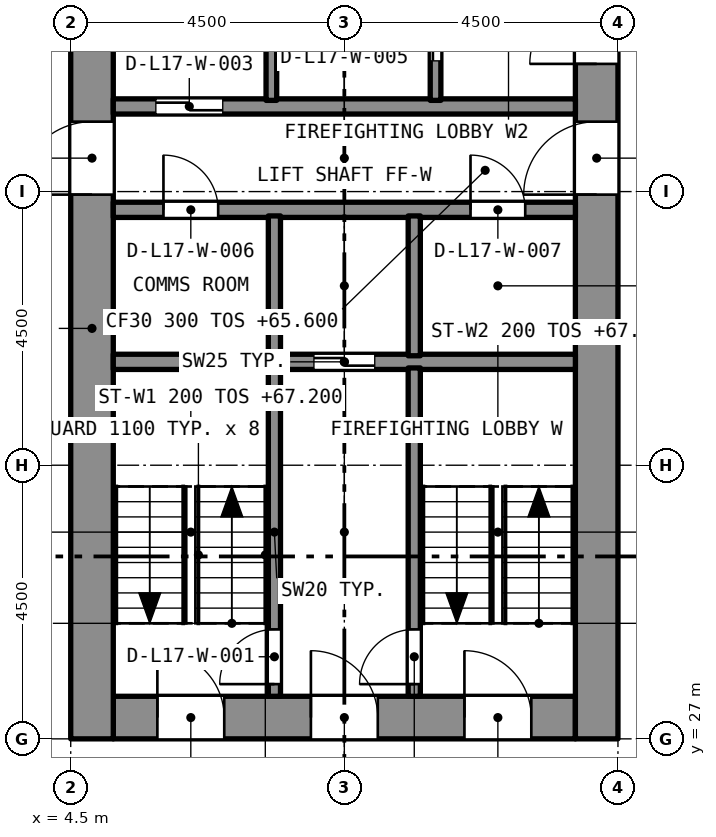
"""IFC4 building model, lengths in metres.
Left out: names, types, materials, properties, quantities, classifications, styles, units other than length and angle.
Written with IfcOpenShell. Run it as: python <this file> out.ifc"""

import sys

from ifc_helpers import new_model, si_unit, direction, frame, frame_2d, origin, place, context, subcontext, project, spatial, rectangle, extrude, element, fill, save


model = new_model("IFC4")
c1 = context("Model", 3, precision=1e-05, world=origin(), true_north=direction((0.0, 1.0)))
c2 = subcontext(c1, "Body", "Model", "MODEL_VIEW")
j1 = project(units=[si_unit("LENGTHUNIT", "METRE"), si_unit("PLANEANGLEUNIT", "RADIAN")], contexts=[c1])
p1 = place(None, origin())
s1 = spatial("IfcSite", under=j1, at=p1, CompositionType="ELEMENT")
p2 = place(p1, origin())
s2 = spatial("IfcBuilding", under=s1, at=p2, CompositionType="ELEMENT")
p3 = place(p2, frame((0.0, 0.0, 65.6)))
s3 = spatial("IfcBuildingStorey", under=s2, at=p3, CompositionType="ELEMENT", Elevation=65.6)
p4 = place(p3, frame((5.2, 27.35, 0.0), z_axis=(0.0, 0.0, 1.0), x_axis=(1.0, 0.0, 0.0)))
e1 = element("IfcWall", 1, at=p4, inside=s3, PredefinedType="SOLIDWALL", context=c2, shape_type="SweptSolid", body=[
    extrude(rectangle(XDim=7.6, YDim=0.7, at=frame_2d((3.8, 0.0))), origin(), (0.0, 0.0, 1.0), 3.2),
])
p5 = place(p4, frame((0.725, 0.0, 0.0)))
e2 = element("IfcOpeningElement", 2, at=p5, cuts=e1, PredefinedType="OPENING", context=c2, shape_type="SweptSolid", body=[
    extrude(rectangle(XDim=1.1, YDim=2.1, at=frame_2d((0.55, 1.05))), frame((0.0, 0.36, 0.0), z_axis=(0.0, -1.0, 0.0), x_axis=(1.0, 0.0, 0.0)), (0.0, 0.0, 1.0), 0.72),
])
p6 = place(p4, frame((3.25, 0.0, 0.0)))
e3 = element("IfcOpeningElement", 3, at=p6, cuts=e1, PredefinedType="OPENING", context=c2, shape_type="SweptSolid", body=[
    extrude(rectangle(XDim=1.1, YDim=2.1, at=frame_2d((0.55, 1.05))), frame((0.0, 0.36, 0.0), z_axis=(0.0, -1.0, 0.0), x_axis=(1.0, 0.0, 0.0)), (0.0, 0.0, 1.0), 0.72),
])
p7 = place(p4, frame((5.775, 0.0, 0.0)))
e4 = element("IfcOpeningElement", 4, at=p7, cuts=e1, PredefinedType="OPENING", context=c2, shape_type="SweptSolid", body=[
    extrude(rectangle(XDim=1.1, YDim=2.1, at=frame_2d((0.55, 1.05))), frame((0.0, 0.36, 0.0), z_axis=(0.0, -1.0, 0.0), x_axis=(1.0, 0.0, 0.0)), (0.0, 0.0, 1.0), 0.72),
])
p8 = place(p3, frame((4.85, 27.0, 0.0), z_axis=(0.0, 0.0, 1.0), x_axis=(0.0, 1.0, 0.0)))
e5 = element("IfcWall", 5, at=p8, inside=s3, PredefinedType="SOLIDWALL", context=c2, shape_type="SweptSolid", body=[
    extrude(rectangle(XDim=13.5, YDim=0.7, at=frame_2d((6.75, 0.0))), origin(), (0.0, 0.0, 1.0), 3.2),
])
p9 = place(p8, frame((8.95, 0.0, 0.0)))
e6 = element("IfcOpeningElement", 6, at=p9, cuts=e5, PredefinedType="OPENING", context=c2, shape_type="SweptSolid", body=[
    extrude(rectangle(XDim=1.2, YDim=2.1, at=frame_2d((0.6, 1.05))), frame((0.0, 0.36, 0.0), z_axis=(0.0, -1.0, 0.0), x_axis=(1.0, 0.0, 0.0)), (0.0, 0.0, 1.0), 0.72),
])
p10 = place(p3, frame((13.15, 27.0, 0.0), z_axis=(0.0, 0.0, 1.0), x_axis=(0.0, 1.0, 0.0)))
e7 = element("IfcWall", 7, at=p10, inside=s3, PredefinedType="SOLIDWALL", context=c2, shape_type="SweptSolid", body=[
    extrude(rectangle(XDim=13.5, YDim=0.7, at=frame_2d((6.75, 0.0))), origin(), (0.0, 0.0, 1.0), 3.2),
])
p11 = place(p10, frame((11.1, 0.0, 0.0)))
e8 = element("IfcOpeningElement", 8, at=p11, cuts=e7, PredefinedType="OPENING", context=c2, shape_type="SweptSolid", body=[
    extrude(rectangle(XDim=1.1, YDim=2.1, at=frame_2d((0.55, 1.05))), frame((0.0, 0.36, 0.0), z_axis=(0.0, -1.0, 0.0), x_axis=(1.0, 0.0, 0.0)), (0.0, 0.0, 1.0), 0.72),
])
p12 = place(p10, frame((8.95, 0.0, 0.0)))
e9 = element("IfcOpeningElement", 9, at=p12, cuts=e7, PredefinedType="OPENING", context=c2, shape_type="SweptSolid", body=[
    extrude(rectangle(XDim=1.2, YDim=2.1, at=frame_2d((0.6, 1.05))), frame((0.0, 0.36, 0.0), z_axis=(0.0, -1.0, 0.0), x_axis=(1.0, 0.0, 0.0)), (0.0, 0.0, 1.0), 0.72),
])
p13 = place(p3, frame((5.2, 33.2, 0.0), z_axis=(0.0, 0.0, 1.0), x_axis=(1.0, 0.0, 0.0)))
e10 = element("IfcWall", 10, at=p13, inside=s3, PredefinedType="SOLIDWALL", context=c2, shape_type="SweptSolid", body=[
    extrude(rectangle(XDim=7.6, YDim=0.25, at=frame_2d((3.8, 0.0))), origin(), (0.0, 0.0, 1.0), 2.9),
])
p14 = place(p13, frame((3.3, 0.0, 0.0)))
e11 = element("IfcOpeningElement", 11, at=p14, cuts=e10, PredefinedType="OPENING", context=c2, shape_type="SweptSolid", body=[
    extrude(rectangle(XDim=1.0, YDim=2.1, at=frame_2d((0.5, 1.05))), frame((0.0, 0.135, 0.0), z_axis=(0.0, -1.0, 0.0), x_axis=(1.0, 0.0, 0.0)), (0.0, 0.0, 1.0), 0.27),
])
p15 = place(p3, frame((5.2, 35.7, 0.0), z_axis=(0.0, 0.0, 1.0), x_axis=(1.0, 0.0, 0.0)))
e12 = element("IfcWall", 12, at=p15, inside=s3, PredefinedType="SOLIDWALL", context=c2, shape_type="SweptSolid", body=[
    extrude(rectangle(XDim=7.6, YDim=0.25, at=frame_2d((3.8, 0.0))), origin(), (0.0, 0.0, 1.0), 2.9),
])
p16 = place(p15, frame((0.825, 0.0, 0.0)))
e13 = element("IfcOpeningElement", 13, at=p16, cuts=e12, PredefinedType="OPENING", context=c2, shape_type="SweptSolid", body=[
    extrude(rectangle(XDim=0.9, YDim=2.1, at=frame_2d((0.45, 1.05))), frame((0.0, 0.135, 0.0), z_axis=(0.0, -1.0, 0.0), x_axis=(1.0, 0.0, 0.0)), (0.0, 0.0, 1.0), 0.27),
])
p17 = place(p15, frame((5.875, 0.0, 0.0)))
e14 = element("IfcOpeningElement", 14, at=p17, cuts=e12, PredefinedType="OPENING", context=c2, shape_type="SweptSolid", body=[
    extrude(rectangle(XDim=0.9, YDim=2.1, at=frame_2d((0.45, 1.05))), frame((0.0, 0.135, 0.0), z_axis=(0.0, -1.0, 0.0), x_axis=(1.0, 0.0, 0.0)), (0.0, 0.0, 1.0), 0.27),
])
p18 = place(p3, frame((5.2, 37.4, 0.0), z_axis=(0.0, 0.0, 1.0), x_axis=(1.0, 0.0, 0.0)))
e15 = element("IfcWall", 15, at=p18, inside=s3, PredefinedType="SOLIDWALL", context=c2, shape_type="SweptSolid", body=[
    extrude(rectangle(XDim=7.6, YDim=0.25, at=frame_2d((3.8, 0.0))), origin(), (0.0, 0.0, 1.0), 2.9),
])
p19 = place(p18, frame((0.7, 0.0, 0.0)))
e16 = element("IfcOpeningElement", 16, at=p19, cuts=e15, PredefinedType="OPENING", context=c2, shape_type="SweptSolid", body=[
    extrude(rectangle(XDim=1.1, YDim=2.4, at=frame_2d((0.55, 1.2))), frame((0.0, 0.135, 0.0), z_axis=(0.0, -1.0, 0.0), x_axis=(1.0, 0.0, 0.0)), (0.0, 0.0, 1.0), 0.27),
])
p20 = place(p3, frame((7.85, 27.7, 0.0), z_axis=(0.0, 0.0, 1.0), x_axis=(0.0, 1.0, 0.0)))
e17 = element("IfcWall", 17, at=p20, inside=s3, PredefinedType="SOLIDWALL", context=c2, shape_type="SweptSolid", body=[
    extrude(rectangle(XDim=5.4, YDim=0.2, at=frame_2d((2.7, 0.0))), origin(), (0.0, 0.0, 1.0), 2.9),
])
p21 = place(p20, frame((0.2, 0.0, 0.0)))
e18 = element("IfcOpeningElement", 18, at=p21, cuts=e17, PredefinedType="OPENING", context=c2, shape_type="SweptSolid", body=[
    extrude(rectangle(XDim=0.9, YDim=2.1, at=frame_2d((0.45, 1.05))), frame((0.0, 0.11, 0.0), z_axis=(0.0, -1.0, 0.0), x_axis=(1.0, 0.0, 0.0)), (0.0, 0.0, 1.0), 0.22),
])
p22 = place(p3, frame((10.15, 27.7, 0.0), z_axis=(0.0, 0.0, 1.0), x_axis=(0.0, 1.0, 0.0)))
e19 = element("IfcWall", 19, at=p22, inside=s3, PredefinedType="SOLIDWALL", context=c2, shape_type="SweptSolid", body=[
    extrude(rectangle(XDim=5.4, YDim=0.2, at=frame_2d((2.7, 0.0))), origin(), (0.0, 0.0, 1.0), 2.9),
])
p23 = place(p22, frame((0.2, 0.0, 0.0)))
e20 = element("IfcOpeningElement", 20, at=p23, cuts=e19, PredefinedType="OPENING", context=c2, shape_type="SweptSolid", body=[
    extrude(rectangle(XDim=0.9, YDim=2.1, at=frame_2d((0.45, 1.05))), frame((0.0, 0.11, 0.0), z_axis=(0.0, -1.0, 0.0), x_axis=(1.0, 0.0, 0.0)), (0.0, 0.0, 1.0), 0.22),
])
for number, where, z_axis, x_axis in (
    (21, (7.85, 33.3, 0.0), (0.0, 0.0, 1.0), (0.0, 1.0, 0.0)),
    (22, (10.15, 33.3, 0.0), (0.0, 0.0, 1.0), (0.0, 1.0, 0.0)),
):
    element("IfcWall", number, at=place(p3, frame(where, z_axis=z_axis, x_axis=x_axis)), inside=s3, PredefinedType="SOLIDWALL", context=c2, shape_type="SweptSolid", body=[
        extrude(rectangle(XDim=2.3, YDim=0.2, at=frame_2d((1.15, 0.0))), origin(), (0.0, 0.0, 1.0), 2.9),
    ])
p24 = place(p3, frame((7.8, 37.5, 0.0), z_axis=(0.0, 0.0, 1.0), x_axis=(0.0, 1.0, 0.0)))
e23 = element("IfcWall", 23, at=p24, inside=s3, PredefinedType="SOLIDWALL", context=c2, shape_type="SweptSolid", body=[
    extrude(rectangle(XDim=2.3, YDim=0.175, at=frame_2d((1.15, 0.0))), origin(), (0.0, 0.0, 1.0), 2.9),
])
p25 = place(p3, frame((10.5, 37.5, 0.0), z_axis=(0.0, 0.0, 1.0), x_axis=(0.0, 1.0, 0.0)))
e24 = element("IfcWall", 24, at=p25, inside=s3, PredefinedType="SOLIDWALL", context=c2, shape_type="SweptSolid", body=[
    extrude(rectangle(XDim=2.3, YDim=0.175, at=frame_2d((1.15, 0.0))), origin(), (0.0, 0.0, 1.0), 2.9),
])
p26 = place(p25, frame((0.65, 0.0, 0.0)))
e25 = element("IfcOpeningElement", 25, at=p26, cuts=e24, PredefinedType="OPENING", context=c2, shape_type="SweptSolid", body=[
    extrude(rectangle(XDim=1.0, YDim=2.1, at=frame_2d((0.5, 1.05))), frame((0.0, 0.097, 0.0), z_axis=(0.0, -1.0, 0.0), x_axis=(1.0, 0.0, 0.0)), (0.0, 0.0, 1.0), 0.195),
])
p27 = place(p21, origin())
e26 = element("IfcDoor", 26, at=p27, inside=s3, OperationType="SINGLE_SWING_LEFT", PredefinedType="DOOR", context=c2, shape_type="SweptSolid", body=[
    extrude(rectangle(XDim=0.9, YDim=2.1, at=frame_2d((0.45, 1.05))), frame((0.0, 0.025, 0.0), z_axis=(0.0, -1.0, 0.0), x_axis=(1.0, 0.0, 0.0)), (0.0, 0.0, 1.0), 0.05),
])
fill(e18, e26)
p28 = place(p23, origin())
e27 = element("IfcDoor", 27, at=p28, inside=s3, OperationType="SINGLE_SWING_LEFT", PredefinedType="DOOR", context=c2, shape_type="SweptSolid", body=[
    extrude(rectangle(XDim=0.9, YDim=2.1, at=frame_2d((0.45, 1.05))), frame((0.0, 0.025, 0.0), z_axis=(0.0, -1.0, 0.0), x_axis=(1.0, 0.0, 0.0)), (0.0, 0.0, 1.0), 0.05),
])
fill(e20, e27)
p29 = place(p19, origin())
e28 = element("IfcDoor", 28, at=p29, inside=s3, OperationType="SLIDING_TO_LEFT", PredefinedType="DOOR", context=c2, shape_type="SweptSolid", body=[
    extrude(rectangle(XDim=1.1, YDim=2.4, at=frame_2d((0.55, 1.2))), frame((0.0, 0.025, 0.0), z_axis=(0.0, -1.0, 0.0), x_axis=(1.0, 0.0, 0.0)), (0.0, 0.0, 1.0), 0.05),
])
fill(e16, e28)
p30 = place(p26, origin())
e29 = element("IfcDoor", 29, at=p30, inside=s3, OperationType="SLIDING_TO_LEFT", PredefinedType="DOOR", context=c2, shape_type="SweptSolid", body=[
    extrude(rectangle(XDim=1.0, YDim=2.1, at=frame_2d((0.5, 1.05))), frame((0.0, 0.025, 0.0), z_axis=(0.0, -1.0, 0.0), x_axis=(1.0, 0.0, 0.0)), (0.0, 0.0, 1.0), 0.05),
])
fill(e25, e29)
p31 = place(p14, origin())
e30 = element("IfcDoor", 30, at=p31, inside=s3, OperationType="SLIDING_TO_LEFT", PredefinedType="DOOR", context=c2, shape_type="SweptSolid", body=[
    extrude(rectangle(XDim=1.0, YDim=2.1, at=frame_2d((0.5, 1.05))), frame((0.0, 0.025, 0.0), z_axis=(0.0, -1.0, 0.0), x_axis=(1.0, 0.0, 0.0)), (0.0, 0.0, 1.0), 0.05),
])
fill(e11, e30)
p32 = place(p16, origin())
e31 = element("IfcDoor", 31, at=p32, inside=s3, OperationType="SINGLE_SWING_LEFT", PredefinedType="DOOR", context=c2, shape_type="SweptSolid", body=[
    extrude(rectangle(XDim=0.9, YDim=2.1, at=frame_2d((0.45, 1.05))), frame((0.0, 0.025, 0.0), z_axis=(0.0, -1.0, 0.0), x_axis=(1.0, 0.0, 0.0)), (0.0, 0.0, 1.0), 0.05),
])
fill(e13, e31)
p33 = place(p17, origin())
e32 = element("IfcDoor", 32, at=p33, inside=s3, OperationType="SINGLE_SWING_LEFT", PredefinedType="DOOR", context=c2, shape_type="SweptSolid", body=[
    extrude(rectangle(XDim=0.9, YDim=2.1, at=frame_2d((0.45, 1.05))), frame((0.0, 0.025, 0.0), z_axis=(0.0, -1.0, 0.0), x_axis=(1.0, 0.0, 0.0)), (0.0, 0.0, 1.0), 0.05),
])
fill(e14, e32)
p34 = place(p5, origin())
e33 = element("IfcDoor", 33, at=p34, inside=s3, OperationType="SINGLE_SWING_LEFT", PredefinedType="DOOR", context=c2, shape_type="SweptSolid", body=[
    extrude(rectangle(XDim=1.1, YDim=2.1, at=frame_2d((0.55, 1.05))), frame((0.0, 0.025, 0.0), z_axis=(0.0, -1.0, 0.0), x_axis=(1.0, 0.0, 0.0)), (0.0, 0.0, 1.0), 0.05),
])
fill(e2, e33)
p35 = place(p6, origin())
e34 = element("IfcDoor", 34, at=p35, inside=s3, OperationType="SINGLE_SWING_LEFT", PredefinedType="DOOR", context=c2, shape_type="SweptSolid", body=[
    extrude(rectangle(XDim=1.1, YDim=2.1, at=frame_2d((0.55, 1.05))), frame((0.0, 0.025, 0.0), z_axis=(0.0, -1.0, 0.0), x_axis=(1.0, 0.0, 0.0)), (0.0, 0.0, 1.0), 0.05),
])
fill(e3, e34)
p36 = place(p7, origin())
e35 = element("IfcDoor", 35, at=p36, inside=s3, OperationType="SINGLE_SWING_LEFT", PredefinedType="DOOR", context=c2, shape_type="SweptSolid", body=[
    extrude(rectangle(XDim=1.1, YDim=2.1, at=frame_2d((0.55, 1.05))), frame((0.0, 0.025, 0.0), z_axis=(0.0, -1.0, 0.0), x_axis=(1.0, 0.0, 0.0)), (0.0, 0.0, 1.0), 0.05),
])
fill(e4, e35)
p37 = place(p11, origin())
e36 = element("IfcDoor", 36, at=p37, inside=s3, OperationType="SINGLE_SWING_LEFT", PredefinedType="DOOR", context=c2, shape_type="SweptSolid", body=[
    extrude(rectangle(XDim=1.1, YDim=2.1, at=frame_2d((0.55, 1.05))), frame((0.0, 0.025, 0.0), z_axis=(0.0, -1.0, 0.0), x_axis=(1.0, 0.0, 0.0)), (0.0, 0.0, 1.0), 0.05),
])
fill(e8, e36)
p38 = place(p9, origin())
e37 = element("IfcDoor", 37, at=p38, inside=s3, OperationType="SINGLE_SWING_LEFT", PredefinedType="DOOR", context=c2, shape_type="SweptSolid", body=[
    extrude(rectangle(XDim=1.2, YDim=2.1, at=frame_2d((0.6, 1.05))), frame((0.0, 0.025, 0.0), z_axis=(0.0, -1.0, 0.0), x_axis=(1.0, 0.0, 0.0)), (0.0, 0.0, 1.0), 0.05),
])
fill(e6, e37)
p39 = place(p12, origin())
e38 = element("IfcDoor", 38, at=p39, inside=s3, OperationType="SINGLE_SWING_LEFT", PredefinedType="DOOR", context=c2, shape_type="SweptSolid", body=[
    extrude(rectangle(XDim=1.2, YDim=2.1, at=frame_2d((0.6, 1.05))), frame((0.0, 0.025, 0.0), z_axis=(0.0, -1.0, 0.0), x_axis=(1.0, 0.0, 0.0)), (0.0, 0.0, 1.0), 0.05),
])
fill(e9, e38)
save(model, sys.argv[1])
